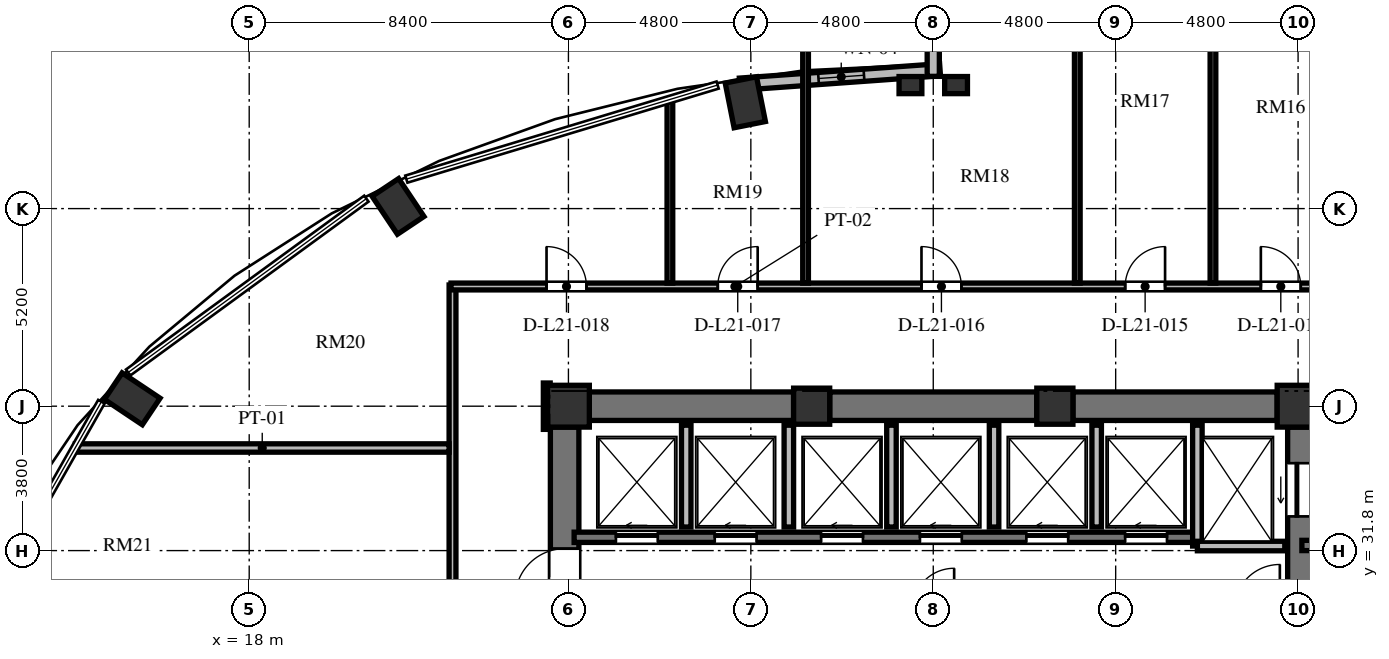
"""IFC4 building model, lengths in metres.
Left out: names, types, materials, properties, quantities, classifications, styles, units other than length and angle.
Written with IfcOpenShell. Run it as: python <this file> out.ifc"""

import sys

from ifc_helpers import new_model, si_unit, direction, frame, frame_2d, origin, origin_2d, place, context, subcontext, project, spatial, rectangle, extrude, element, fill, save


model = new_model("IFC4")
c1 = context("Model", 3, precision=1e-05, world=origin(), true_north=direction((0.0, 1.0)))
c2 = subcontext(c1, "Body", "Model", "MODEL_VIEW")
j1 = project(units=[si_unit("LENGTHUNIT", "METRE"), si_unit("PLANEANGLEUNIT", "RADIAN")], contexts=[c1])
p1 = place(None, origin())
s1 = spatial("IfcSite", under=j1, at=p1, CompositionType="ELEMENT")
p2 = place(p1, origin())
s2 = spatial("IfcBuilding", under=s1, at=p2, CompositionType="ELEMENT")
p3 = place(p2, frame((0.0, 0.0, 85.392)))
s3 = spatial("IfcBuildingStorey", under=s2, at=p3, CompositionType="ELEMENT", Elevation=85.392)
for number, where, z_axis, x_axis in (
    (1, (31.054, 43.597, 0.0), (0.0, 0.0, 1.0), (-0.195, 0.981, 0.0)),
    (2, (21.916, 40.857, 0.0), (0.0, 0.0, 1.0), (-0.556, 0.831, 0.0)),
    (3, (14.922, 35.795, 0.0), (0.0, 0.0, 1.0), (-0.831, 0.556, 0.0)),
):
    element("IfcColumn", number, at=place(p3, frame(where, z_axis=z_axis, x_axis=x_axis)), inside=s3, PredefinedType="COLUMN", context=c2, shape_type="SweptSolid", body=[
        extrude(rectangle(XDim=1.2, YDim=0.84, at=origin_2d()), origin(), (0.0, 0.0, 1.0), 3.648),
    ])
p4 = place(p3, frame((45.6, 35.6, 0.0), z_axis=(0.0, 0.0, 1.0), x_axis=(1.0, 0.0, 0.0)))
e4 = element("IfcColumn", 4, at=p4, inside=s3, PredefinedType="COLUMN", context=c2, shape_type="SweptSolid", body=[
    extrude(rectangle(XDim=1.1, YDim=1.1, at=origin_2d()), origin(), (0.0, 0.0, 1.0), 3.648),
])
for number, where, z_axis, x_axis in (
    (5, (39.2, 35.6, 0.0), (0.0, 0.0, 1.0), (1.0, 0.0, 0.0)),
    (6, (32.8, 35.6, 0.0), (0.0, 0.0, 1.0), (1.0, 0.0, 0.0)),
):
    element("IfcColumn", number, at=place(p3, frame(where, z_axis=z_axis, x_axis=x_axis)), inside=s3, PredefinedType="COLUMN", context=c2, shape_type="SweptSolid", body=[
        extrude(rectangle(XDim=0.95, YDim=0.95, at=origin_2d()), origin(), (0.0, 0.0, 1.0), 3.648),
    ])
p5 = place(p3, frame((26.4, 35.6, 0.0), z_axis=(0.0, 0.0, 1.0), x_axis=(1.0, 0.0, 0.0)))
e7 = element("IfcColumn", 7, at=p5, inside=s3, PredefinedType="COLUMN", context=c2, shape_type="SweptSolid", body=[
    extrude(rectangle(XDim=1.1, YDim=1.1, at=origin_2d()), origin(), (0.0, 0.0, 1.0), 3.648),
])
for number, where, z_axis, x_axis in (
    (8, (35.4, 44.05, 0.0), (0.0, 0.0, 1.0), (1.0, 0.0, 0.0)),
    (9, (36.6, 44.05, 0.0), (0.0, 0.0, 1.0), (1.0, 0.0, 0.0)),
):
    element("IfcColumn", number, at=place(p3, frame(where, z_axis=z_axis, x_axis=x_axis)), inside=s3, PredefinedType="PILASTER", context=c2, shape_type="SweptSolid", body=[
        extrude(rectangle(XDim=0.6, YDim=0.45, at=origin_2d()), origin(), (0.0, 0.0, 1.0), 3.648),
    ])
p6 = place(p3, frame((26.3, 20.95, 0.0), z_axis=(0.0, 0.0, 1.0), x_axis=(0.0, 1.0, 0.0)))
e10 = element("IfcWall", 10, at=p6, inside=s3, PredefinedType="SHEAR", context=c2, shape_type="SweptSolid", body=[
    extrude(rectangle(XDim=14.1, YDim=0.75, at=frame_2d((7.05, 0.0))), origin(), (0.0, 0.0, 1.0), 3.648),
])
p7 = place(p6, frame((6.5, 0.0, 0.0)))
e11 = element("IfcOpeningElement", 11, at=p7, cuts=e10, PredefinedType="OPENING", context=c2, shape_type="SweptSolid", body=[
    extrude(rectangle(XDim=1.2, YDim=2.15, at=frame_2d((0.6, 1.075))), frame((0.0, 0.385, 0.0), z_axis=(0.0, -1.0, 0.0), x_axis=(1.0, 0.0, 0.0)), (0.0, 0.0, 1.0), 0.77),
])
p8 = place(p6, frame((9.6, 0.0, 0.0)))
e12 = element("IfcOpeningElement", 12, at=p8, cuts=e10, PredefinedType="OPENING", context=c2, shape_type="SweptSolid", body=[
    extrude(rectangle(XDim=1.3, YDim=2.2, at=frame_2d((0.65, 1.1))), frame((0.0, 0.385, 0.0), z_axis=(0.0, -1.0, 0.0), x_axis=(1.0, 0.0, 0.0)), (0.0, 0.0, 1.0), 0.77),
])
p9 = place(p6, frame((3.26, 0.0, 0.0)))
e13 = element("IfcOpeningElement", 13, at=p9, cuts=e10, PredefinedType="OPENING", context=c2, shape_type="SweptSolid", body=[
    extrude(rectangle(XDim=1.3, YDim=2.2, at=frame_2d((0.65, 1.1))), frame((0.0, 0.385, 0.0), z_axis=(0.0, -1.0, 0.0), x_axis=(1.0, 0.0, 0.0)), (0.0, 0.0, 1.0), 0.77),
])
p10 = place(p3, frame((45.7, 20.95, 0.0), z_axis=(0.0, 0.0, 1.0), x_axis=(0.0, 1.0, 0.0)))
e14 = element("IfcWall", 14, at=p10, inside=s3, PredefinedType="SHEAR", context=c2, shape_type="SweptSolid", body=[
    extrude(rectangle(XDim=14.1, YDim=0.75, at=frame_2d((7.05, 0.0))), origin(), (0.0, 0.0, 1.0), 3.648),
])
p11 = place(p10, frame((11.75, 0.0, 0.0)))
e15 = element("IfcOpeningElement", 15, at=p11, cuts=e14, PredefinedType="OPENING", context=c2, shape_type="SweptSolid", body=[
    extrude(rectangle(XDim=1.4, YDim=2.3, at=frame_2d((0.7, 1.15))), frame((0.0, 0.385, 0.0), z_axis=(0.0, -1.0, 0.0), x_axis=(1.0, 0.0, 0.0)), (0.0, 0.0, 1.0), 0.77),
])
p12 = place(p10, frame((0.95, 0.0, 0.0)))
e16 = element("IfcOpeningElement", 16, at=p12, cuts=e14, PredefinedType="OPENING", context=c2, shape_type="SweptSolid", body=[
    extrude(rectangle(XDim=1.4, YDim=2.3, at=frame_2d((0.7, 1.15))), frame((0.0, 0.385, 0.0), z_axis=(0.0, -1.0, 0.0), x_axis=(1.0, 0.0, 0.0)), (0.0, 0.0, 1.0), 0.77),
])
p13 = place(p3, frame((26.95, 35.6, 0.0), z_axis=(0.0, 0.0, 1.0), x_axis=(1.0, 0.0, 0.0)))
e17 = element("IfcWall", 17, at=p13, inside=s3, PredefinedType="SHEAR", context=c2, shape_type="SweptSolid", body=[
    extrude(rectangle(XDim=5.375, YDim=0.75, at=frame_2d((2.688, 0.0))), origin(), (0.0, 0.0, 1.0), 3.648),
])
p14 = place(p3, frame((33.275, 35.6, 0.0), z_axis=(0.0, 0.0, 1.0), x_axis=(1.0, 0.0, 0.0)))
e18 = element("IfcWall", 18, at=p14, inside=s3, PredefinedType="SHEAR", context=c2, shape_type="SweptSolid", body=[
    extrude(rectangle(XDim=5.45, YDim=0.75, at=frame_2d((2.725, 0.0))), origin(), (0.0, 0.0, 1.0), 3.648),
])
p15 = place(p3, frame((39.675, 35.6, 0.0), z_axis=(0.0, 0.0, 1.0), x_axis=(1.0, 0.0, 0.0)))
e19 = element("IfcWall", 19, at=p15, inside=s3, PredefinedType="SHEAR", context=c2, shape_type="SweptSolid", body=[
    extrude(rectangle(XDim=5.375, YDim=0.75, at=frame_2d((2.688, 0.0))), origin(), (0.0, 0.0, 1.0), 3.648),
])
p16 = place(p3, frame((36.179, 44.453, 0.0), z_axis=(0.0, 0.0, 1.0), x_axis=(-0.997431890304, -0.071621394884, 0.0)))
e20 = element("IfcWall", 20, at=p16, inside=s3, PredefinedType="SOLIDWALL", context=c2, shape_type="SweptSolid", body=[
    extrude(rectangle(XDim=5.284, YDim=0.32, at=frame_2d((2.642, 0.0))), origin(), (0.0, 0.0, 1.0), 3.428),
])
p17 = place(p16, frame((2.007, 0.0, 0.85)))
e21 = element("IfcOpeningElement", 21, at=p17, cuts=e20, PredefinedType="OPENING", context=c2, shape_type="SweptSolid", body=[
    extrude(rectangle(XDim=1.2, YDim=1.8, at=frame_2d((0.6, 0.9))), frame((0.0, 0.17, 0.0), z_axis=(0.0, -1.0, 0.0), x_axis=(1.0, 0.0, 0.0)), (0.0, 0.0, 1.0), 0.34),
])
p18 = place(p3, frame((36.0, 49.4, 0.0), z_axis=(0.0, 0.0, 1.0), x_axis=(0.0, -1.0, 0.0)))
e22 = element("IfcWall", 22, at=p18, inside=s3, PredefinedType="SOLIDWALL", context=c2, shape_type="SweptSolid", body=[
    extrude(rectangle(XDim=5.12, YDim=0.32, at=frame_2d((2.56, 0.0))), origin(), (0.0, 0.0, 1.0), 3.428),
])
p19 = place(p18, frame((1.36, 0.0, 0.84)))
e23 = element("IfcOpeningElement", 23, at=p19, cuts=e22, PredefinedType="OPENING", context=c2, shape_type="SweptSolid", body=[
    extrude(rectangle(XDim=2.4, YDim=2.04, at=frame_2d((1.2, 1.02))), frame((0.0, 0.17, 0.0), z_axis=(0.0, -1.0, 0.0), x_axis=(1.0, 0.0, 0.0)), (0.0, 0.0, 1.0), 0.34),
])
p20 = place(p3, frame((26.55, 32.15, 0.0), z_axis=(0.0, 0.0, 1.0), x_axis=(1.0, 0.0, 0.0)))
e24 = element("IfcWall", 24, at=p20, inside=s3, PredefinedType="SHEAR", context=c2, shape_type="SweptSolid", body=[
    extrude(rectangle(XDim=16.4, YDim=0.27, at=frame_2d((8.2, 0.0))), origin(), (0.0, 0.0, 1.0), 3.648),
])
p21 = place(p20, frame((1.1, 0.0, 0.0)))
e25 = element("IfcOpeningElement", 25, at=p21, cuts=e24, PredefinedType="OPENING", context=c2, shape_type="SweptSolid", body=[
    extrude(rectangle(XDim=1.1, YDim=2.2, at=frame_2d((0.55, 1.1))), frame((0.0, 0.145, 0.0), z_axis=(0.0, -1.0, 0.0), x_axis=(1.0, 0.0, 0.0)), (0.0, 0.0, 1.0), 0.29),
])
p22 = place(p20, frame((3.7, 0.0, 0.0)))
e26 = element("IfcOpeningElement", 26, at=p22, cuts=e24, PredefinedType="OPENING", context=c2, shape_type="SweptSolid", body=[
    extrude(rectangle(XDim=1.1, YDim=2.2, at=frame_2d((0.55, 1.1))), frame((0.0, 0.145, 0.0), z_axis=(0.0, -1.0, 0.0), x_axis=(1.0, 0.0, 0.0)), (0.0, 0.0, 1.0), 0.29),
])
p23 = place(p20, frame((6.5, 0.0, 0.0)))
e27 = element("IfcOpeningElement", 27, at=p23, cuts=e24, PredefinedType="OPENING", context=c2, shape_type="SweptSolid", body=[
    extrude(rectangle(XDim=1.1, YDim=2.2, at=frame_2d((0.55, 1.1))), frame((0.0, 0.145, 0.0), z_axis=(0.0, -1.0, 0.0), x_axis=(1.0, 0.0, 0.0)), (0.0, 0.0, 1.0), 0.29),
])
p24 = place(p20, frame((9.1, 0.0, 0.0)))
e28 = element("IfcOpeningElement", 28, at=p24, cuts=e24, PredefinedType="OPENING", context=c2, shape_type="SweptSolid", body=[
    extrude(rectangle(XDim=1.1, YDim=2.2, at=frame_2d((0.55, 1.1))), frame((0.0, 0.145, 0.0), z_axis=(0.0, -1.0, 0.0), x_axis=(1.0, 0.0, 0.0)), (0.0, 0.0, 1.0), 0.29),
])
p25 = place(p20, frame((11.9, 0.0, 0.0)))
e29 = element("IfcOpeningElement", 29, at=p25, cuts=e24, PredefinedType="OPENING", context=c2, shape_type="SweptSolid", body=[
    extrude(rectangle(XDim=1.1, YDim=2.2, at=frame_2d((0.55, 1.1))), frame((0.0, 0.145, 0.0), z_axis=(0.0, -1.0, 0.0), x_axis=(1.0, 0.0, 0.0)), (0.0, 0.0, 1.0), 0.29),
])
p26 = place(p20, frame((14.5, 0.0, 0.0)))
e30 = element("IfcOpeningElement", 30, at=p26, cuts=e24, PredefinedType="OPENING", context=c2, shape_type="SweptSolid", body=[
    extrude(rectangle(XDim=1.1, YDim=2.2, at=frame_2d((0.55, 1.1))), frame((0.0, 0.145, 0.0), z_axis=(0.0, -1.0, 0.0), x_axis=(1.0, 0.0, 0.0)), (0.0, 0.0, 1.0), 0.29),
])
p27 = place(p3, frame((42.95, 31.92, 0.0), z_axis=(0.0, 0.0, 1.0), x_axis=(0.0, 1.0, 0.0)))
e31 = element("IfcWall", 31, at=p27, inside=s3, PredefinedType="SOLIDWALL", context=c2, shape_type="SweptSolid", body=[
    extrude(rectangle(XDim=3.18, YDim=0.25, at=frame_2d((1.59, 0.0))), origin(), (0.0, 0.0, 1.0), 3.428),
])
p28 = place(p3, frame((42.95, 31.92, 0.0), z_axis=(0.0, 0.0, 1.0), x_axis=(1.0, 0.0, 0.0)))
e32 = element("IfcWall", 32, at=p28, inside=s3, PredefinedType="SOLIDWALL", context=c2, shape_type="SweptSolid", body=[
    extrude(rectangle(XDim=2.3, YDim=0.25, at=frame_2d((1.15, 0.0))), origin(), (0.0, 0.0, 1.0), 3.428),
])
for number, where, z_axis, x_axis in (
    (33, (29.5, 32.42, 0.0), (0.0, 0.0, 1.0), (0.0, 1.0, 0.0)),
    (34, (32.2, 32.42, 0.0), (0.0, 0.0, 1.0), (0.0, 1.0, 0.0)),
    (35, (34.9, 32.42, 0.0), (0.0, 0.0, 1.0), (0.0, 1.0, 0.0)),
    (36, (37.6, 32.42, 0.0), (0.0, 0.0, 1.0), (0.0, 1.0, 0.0)),
    (37, (40.3, 32.42, 0.0), (0.0, 0.0, 1.0), (0.0, 1.0, 0.0)),
):
    element("IfcWall", number, at=place(p3, frame(where, z_axis=z_axis, x_axis=x_axis)), inside=s3, PredefinedType="SOLIDWALL", context=c2, shape_type="SweptSolid", body=[
        extrude(rectangle(XDim=2.68, YDim=0.25, at=frame_2d((1.34, 0.0))), origin(), (0.0, 0.0, 1.0), 3.428),
    ])
p29 = place(p3, frame((45.7, 31.935, 0.0), z_axis=(0.0, 0.0, 1.0), x_axis=(1.0, 0.0, 0.0)))
e38 = element("IfcWall", 38, at=p29, inside=s3, PredefinedType="SHEAR", context=c2, shape_type="SweptSolid", body=[
    extrude(rectangle(XDim=4.715, YDim=0.27, at=frame_2d((2.357, 0.0))), origin(), (0.0, 0.0, 1.0), 3.648),
])
p30 = place(p3, frame((23.35, 29.36, 0.0), z_axis=(0.0, 0.0, 1.0), x_axis=(0.0, 1.0, 0.0)))
e39 = element("IfcWall", 39, at=p30, inside=s3, PredefinedType="PARTITIONING", context=c2, shape_type="SweptSolid", body=[
    extrude(rectangle(XDim=9.43, YDim=0.18, at=frame_2d((4.715, 0.0))), origin(), (0.0, 0.0, 1.0), 3.428),
])
p31 = place(p3, frame((23.31, 38.75, 0.0), z_axis=(0.0, 0.0, 1.0), x_axis=(1.0, 0.0, 0.0)))
e40 = element("IfcWall", 40, at=p31, inside=s3, PredefinedType="PARTITIONING", context=c2, shape_type="SweptSolid", body=[
    extrude(rectangle(XDim=29.88, YDim=0.18, at=frame_2d((14.94, 0.0))), origin(), (0.0, 0.0, 1.0), 3.053),
])
p32 = place(p31, frame((26.066, 0.0, 0.0)))
e41 = element("IfcOpeningElement", 41, at=p32, cuts=e40, PredefinedType="OPENING", context=c2, shape_type="SweptSolid", body=[
    extrude(rectangle(XDim=1.05, YDim=2.15, at=frame_2d((0.525, 1.075))), frame((0.0, 0.1, 0.0), z_axis=(0.0, -1.0, 0.0), x_axis=(1.0, 0.0, 0.0)), (0.0, 0.0, 1.0), 0.2),
])
p33 = place(p31, frame((21.31, 0.0, 0.0)))
e42 = element("IfcOpeningElement", 42, at=p33, cuts=e40, PredefinedType="OPENING", context=c2, shape_type="SweptSolid", body=[
    extrude(rectangle(XDim=1.05, YDim=2.15, at=frame_2d((0.525, 1.075))), frame((0.0, 0.1, 0.0), z_axis=(0.0, -1.0, 0.0), x_axis=(1.0, 0.0, 0.0)), (0.0, 0.0, 1.0), 0.2),
])
p34 = place(p31, frame((17.74, 0.0, 0.0)))
e43 = element("IfcOpeningElement", 43, at=p34, cuts=e40, PredefinedType="OPENING", context=c2, shape_type="SweptSolid", body=[
    extrude(rectangle(XDim=1.05, YDim=2.15, at=frame_2d((0.525, 1.075))), frame((0.0, 0.1, 0.0), z_axis=(0.0, -1.0, 0.0), x_axis=(1.0, 0.0, 0.0)), (0.0, 0.0, 1.0), 0.2),
])
p35 = place(p31, frame((12.38, 0.0, 0.0)))
e44 = element("IfcOpeningElement", 44, at=p35, cuts=e40, PredefinedType="OPENING", context=c2, shape_type="SweptSolid", body=[
    extrude(rectangle(XDim=1.05, YDim=2.15, at=frame_2d((0.525, 1.075))), frame((0.0, 0.1, 0.0), z_axis=(0.0, -1.0, 0.0), x_axis=(1.0, 0.0, 0.0)), (0.0, 0.0, 1.0), 0.2),
])
p36 = place(p31, frame((7.02, 0.0, 0.0)))
e45 = element("IfcOpeningElement", 45, at=p36, cuts=e40, PredefinedType="OPENING", context=c2, shape_type="SweptSolid", body=[
    extrude(rectangle(XDim=1.05, YDim=2.15, at=frame_2d((0.525, 1.075))), frame((0.0, 0.1, 0.0), z_axis=(0.0, -1.0, 0.0), x_axis=(1.0, 0.0, 0.0)), (0.0, 0.0, 1.0), 0.2),
])
p37 = place(p31, frame((2.514, 0.0, 0.0)))
e46 = element("IfcOpeningElement", 46, at=p37, cuts=e40, PredefinedType="OPENING", context=c2, shape_type="SweptSolid", body=[
    extrude(rectangle(XDim=1.05, YDim=2.15, at=frame_2d((0.525, 1.075))), frame((0.0, 0.1, 0.0), z_axis=(0.0, -1.0, 0.0), x_axis=(1.0, 0.0, 0.0)), (0.0, 0.0, 1.0), 0.2),
])
p38 = place(p3, frame((25.83, 36.21, 0.0), z_axis=(0.0, 0.0, 1.0), x_axis=(0.0, -1.0, 0.0)))
e47 = element("IfcWall", 47, at=p38, inside=s3, PredefinedType="PARTITIONING", context=c2, shape_type="SweptSolid", body=[
    extrude(rectangle(XDim=1.22, YDim=0.18, at=frame_2d((0.61, 0.0))), origin(), (0.0, 0.0, 1.0), 3.428),
])
p39 = place(p3, frame((13.426, 34.5, 0.0), z_axis=(0.0, 0.0, 1.0), x_axis=(1.0, 0.0, 0.0)))
e48 = element("IfcWall", 48, at=p39, inside=s3, PredefinedType="PARTITIONING", context=c2, shape_type="SweptSolid", body=[
    extrude(rectangle(XDim=9.834, YDim=0.22, at=frame_2d((4.917, 0.0))), origin(), (0.0, 0.0, 1.0), 3.428),
])
p40 = place(p3, frame((29.07, 38.84, 0.0), z_axis=(0.0, 0.0, 1.0), x_axis=(0.0, 1.0, 0.0)))
e49 = element("IfcWall", 49, at=p40, inside=s3, PredefinedType="PARTITIONING", context=c2, shape_type="SweptSolid", body=[
    extrude(rectangle(XDim=4.817, YDim=0.15, at=frame_2d((2.409, 0.0))), origin(), (0.0, 0.0, 1.0), 3.428),
])
p41 = place(p3, frame((32.64, 38.84, 0.0), z_axis=(0.0, 0.0, 1.0), x_axis=(0.0, 1.0, 0.0)))
e50 = element("IfcWall", 50, at=p41, inside=s3, PredefinedType="PARTITIONING", context=c2, shape_type="SweptSolid", body=[
    extrude(rectangle(XDim=6.38, YDim=0.15, at=frame_2d((3.19, 0.0))), origin(), (0.0, 0.0, 1.0), 3.428),
])
p42 = place(p3, frame((39.79, 38.84, 0.0), z_axis=(0.0, 0.0, 1.0), x_axis=(0.0, 1.0, 0.0)))
e51 = element("IfcWall", 51, at=p42, inside=s3, PredefinedType="PARTITIONING", context=c2, shape_type="SweptSolid", body=[
    extrude(rectangle(XDim=10.135, YDim=0.15, at=frame_2d((5.068, 0.0))), origin(), (0.0, 0.0, 1.0), 2.813),
])
p43 = place(p3, frame((43.36, 38.84, 0.0), z_axis=(0.0, 0.0, 1.0), x_axis=(0.0, 1.0, 0.0)))
e52 = element("IfcWall", 52, at=p43, inside=s3, PredefinedType="PARTITIONING", context=c2, shape_type="SweptSolid", body=[
    extrude(rectangle(XDim=9.487, YDim=0.15, at=frame_2d((4.744, 0.0))), origin(), (0.0, 0.0, 1.0), 3.428),
])
p44 = place(p17, origin())
e53 = element("IfcWindow", 53, at=p44, inside=s3, PartitioningType="SINGLE_PANEL", PredefinedType="WINDOW", context=c2, shape_type="SweptSolid", body=[
    extrude(rectangle(XDim=1.2, YDim=1.8, at=frame_2d((0.6, 0.9))), frame((0.0, 0.03, 0.0), z_axis=(0.0, -1.0, 0.0), x_axis=(1.0, 0.0, 0.0)), (0.0, 0.0, 1.0), 0.06),
])
fill(e21, e53)
p45 = place(p8, origin())
e54 = element("IfcDoor", 54, at=p45, inside=s3, OperationType="SINGLE_SWING_LEFT", PredefinedType="DOOR", context=c2, shape_type="SweptSolid", body=[
    extrude(rectangle(XDim=1.3, YDim=2.2, at=frame_2d((0.65, 1.1))), frame((0.0, 0.025, 0.0), z_axis=(0.0, -1.0, 0.0), x_axis=(1.0, 0.0, 0.0)), (0.0, 0.0, 1.0), 0.05),
])
fill(e12, e54)
p46 = place(p21, origin())
e55 = element("IfcDoor", 55, at=p46, inside=s3, OperationType="SLIDING_TO_LEFT", PredefinedType="DOOR", context=c2, shape_type="SweptSolid", body=[
    extrude(rectangle(XDim=1.1, YDim=2.2, at=frame_2d((0.55, 1.1))), frame((0.0, 0.025, 0.0), z_axis=(0.0, -1.0, 0.0), x_axis=(1.0, 0.0, 0.0)), (0.0, 0.0, 1.0), 0.05),
])
fill(e25, e55)
p47 = place(p22, origin())
e56 = element("IfcDoor", 56, at=p47, inside=s3, OperationType="SLIDING_TO_LEFT", PredefinedType="DOOR", context=c2, shape_type="SweptSolid", body=[
    extrude(rectangle(XDim=1.1, YDim=2.2, at=frame_2d((0.55, 1.1))), frame((0.0, 0.025, 0.0), z_axis=(0.0, -1.0, 0.0), x_axis=(1.0, 0.0, 0.0)), (0.0, 0.0, 1.0), 0.05),
])
fill(e26, e56)
p48 = place(p23, origin())
e57 = element("IfcDoor", 57, at=p48, inside=s3, OperationType="SLIDING_TO_LEFT", PredefinedType="DOOR", context=c2, shape_type="SweptSolid", body=[
    extrude(rectangle(XDim=1.1, YDim=2.2, at=frame_2d((0.55, 1.1))), frame((0.0, 0.025, 0.0), z_axis=(0.0, -1.0, 0.0), x_axis=(1.0, 0.0, 0.0)), (0.0, 0.0, 1.0), 0.05),
])
fill(e27, e57)
p49 = place(p24, origin())
e58 = element("IfcDoor", 58, at=p49, inside=s3, OperationType="SLIDING_TO_LEFT", PredefinedType="DOOR", context=c2, shape_type="SweptSolid", body=[
    extrude(rectangle(XDim=1.1, YDim=2.2, at=frame_2d((0.55, 1.1))), frame((0.0, 0.025, 0.0), z_axis=(0.0, -1.0, 0.0), x_axis=(1.0, 0.0, 0.0)), (0.0, 0.0, 1.0), 0.05),
])
fill(e28, e58)
p50 = place(p25, origin())
e59 = element("IfcDoor", 59, at=p50, inside=s3, OperationType="SLIDING_TO_LEFT", PredefinedType="DOOR", context=c2, shape_type="SweptSolid", body=[
    extrude(rectangle(XDim=1.1, YDim=2.2, at=frame_2d((0.55, 1.1))), frame((0.0, 0.025, 0.0), z_axis=(0.0, -1.0, 0.0), x_axis=(1.0, 0.0, 0.0)), (0.0, 0.0, 1.0), 0.05),
])
fill(e29, e59)
p51 = place(p26, origin())
e60 = element("IfcDoor", 60, at=p51, inside=s3, OperationType="SLIDING_TO_LEFT", PredefinedType="DOOR", context=c2, shape_type="SweptSolid", body=[
    extrude(rectangle(XDim=1.1, YDim=2.2, at=frame_2d((0.55, 1.1))), frame((0.0, 0.025, 0.0), z_axis=(0.0, -1.0, 0.0), x_axis=(1.0, 0.0, 0.0)), (0.0, 0.0, 1.0), 0.05),
])
fill(e30, e60)
p52 = place(p11, origin())
e61 = element("IfcDoor", 61, at=p52, inside=s3, OperationType="SLIDING_TO_LEFT", PredefinedType="DOOR", context=c2, shape_type="SweptSolid", body=[
    extrude(rectangle(XDim=1.4, YDim=2.3, at=frame_2d((0.7, 1.15))), frame((0.0, 0.025, 0.0), z_axis=(0.0, -1.0, 0.0), x_axis=(1.0, 0.0, 0.0)), (0.0, 0.0, 1.0), 0.05),
])
fill(e15, e61)
p53 = place(p33, origin())
e62 = element("IfcDoor", 62, at=p53, inside=s3, OperationType="SINGLE_SWING_LEFT", PredefinedType="DOOR", context=c2, shape_type="SweptSolid", body=[
    extrude(rectangle(XDim=1.05, YDim=2.15, at=frame_2d((0.525, 1.075))), frame((0.0, 0.025, 0.0), z_axis=(0.0, -1.0, 0.0), x_axis=(1.0, 0.0, 0.0)), (0.0, 0.0, 1.0), 0.05),
])
fill(e42, e62)
p54 = place(p34, origin())
e63 = element("IfcDoor", 63, at=p54, inside=s3, OperationType="SINGLE_SWING_RIGHT", PredefinedType="DOOR", context=c2, shape_type="SweptSolid", body=[
    extrude(rectangle(XDim=1.05, YDim=2.15, at=frame_2d((0.525, 1.075))), frame((0.0, 0.025, 0.0), z_axis=(0.0, -1.0, 0.0), x_axis=(1.0, 0.0, 0.0)), (0.0, 0.0, 1.0), 0.05),
])
fill(e43, e63)
p55 = place(p35, origin())
e64 = element("IfcDoor", 64, at=p55, inside=s3, OperationType="SINGLE_SWING_LEFT", PredefinedType="DOOR", context=c2, shape_type="SweptSolid", body=[
    extrude(rectangle(XDim=1.05, YDim=2.15, at=frame_2d((0.525, 1.075))), frame((0.0, 0.025, 0.0), z_axis=(0.0, -1.0, 0.0), x_axis=(1.0, 0.0, 0.0)), (0.0, 0.0, 1.0), 0.05),
])
fill(e44, e64)
p56 = place(p36, origin())
e65 = element("IfcDoor", 65, at=p56, inside=s3, OperationType="SINGLE_SWING_RIGHT", PredefinedType="DOOR", context=c2, shape_type="SweptSolid", body=[
    extrude(rectangle(XDim=1.05, YDim=2.15, at=frame_2d((0.525, 1.075))), frame((0.0, 0.025, 0.0), z_axis=(0.0, -1.0, 0.0), x_axis=(1.0, 0.0, 0.0)), (0.0, 0.0, 1.0), 0.05),
])
fill(e45, e65)
p57 = place(p37, origin())
e66 = element("IfcDoor", 66, at=p57, inside=s3, OperationType="SINGLE_SWING_LEFT", PredefinedType="DOOR", context=c2, shape_type="SweptSolid", body=[
    extrude(rectangle(XDim=1.05, YDim=2.15, at=frame_2d((0.525, 1.075))), frame((0.0, 0.025, 0.0), z_axis=(0.0, -1.0, 0.0), x_axis=(1.0, 0.0, 0.0)), (0.0, 0.0, 1.0), 0.05),
])
fill(e46, e66)
save(model, sys.argv[1])
